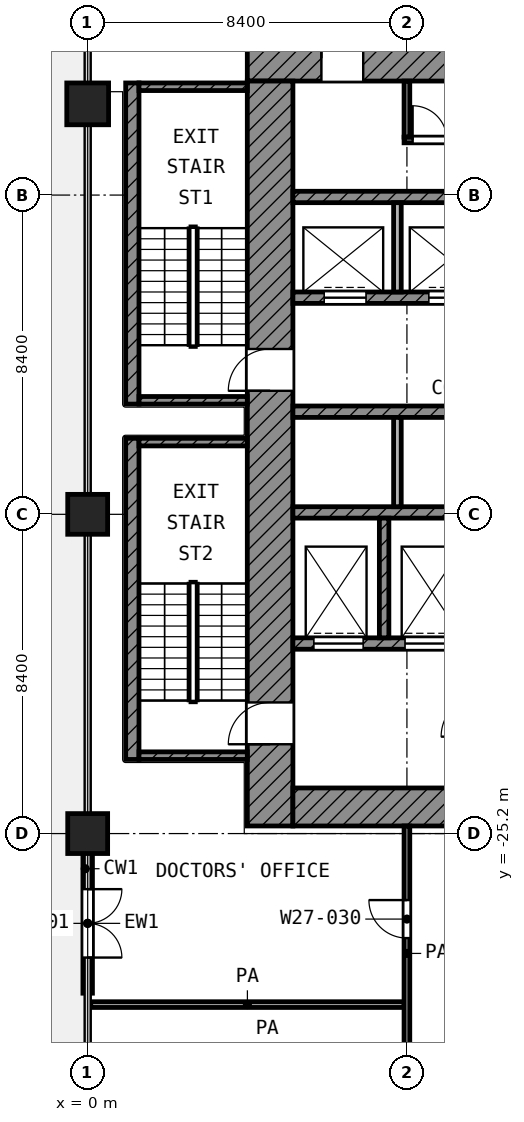
"""IFC4 building model, lengths in metres.
Left out: names, types, materials, properties, quantities, classifications, styles, units other than length and angle.
Written with IfcOpenShell. Run it as: python <this file> out.ifc"""

import sys

from ifc_helpers import new_model, si_unit, direction, frame, frame_2d, origin, origin_2d, place, context, subcontext, project, spatial, rectangle, extrude, element, fill, save


model = new_model("IFC4")
c1 = context("Model", 3, precision=1e-05, world=origin(), true_north=direction((0.0, 1.0)))
c2 = subcontext(c1, "Body", "Model", "MODEL_VIEW")
j1 = project(units=[si_unit("LENGTHUNIT", "METRE"), si_unit("PLANEANGLEUNIT", "RADIAN")], contexts=[c1])
p1 = place(None, origin())
s1 = spatial("IfcSite", under=j1, at=p1, CompositionType="ELEMENT")
p2 = place(p1, origin())
s2 = spatial("IfcBuilding", under=s1, at=p2, CompositionType="ELEMENT")
p3 = place(p2, frame((0.0, 0.0, 140.8)))
s3 = spatial("IfcBuildingStorey", under=s2, at=p3, CompositionType="ELEMENT", Elevation=140.8)
p4 = place(p3, frame((0.0, -6.0, 0.0), z_axis=(0.0, 0.0, 1.0), x_axis=(1.0, 0.0, 0.0)))
e1 = element("IfcColumn", 1, at=p4, inside=s3, PredefinedType="COLUMN", context=c2, shape_type="SweptSolid", body=[
    extrude(rectangle(XDim=1.1, YDim=1.1, at=origin_2d()), origin(), (0.0, 0.0, 1.0), 4.2),
])
for number, where, z_axis, x_axis in (
    (2, (0.0, -16.8, 0.0), (0.0, 0.0, 1.0), (1.0, 0.0, 0.0)),
    (3, (0.0, -25.2, 0.0), (0.0, 0.0, 1.0), (1.0, 0.0, 0.0)),
):
    element("IfcColumn", number, at=place(p3, frame(where, z_axis=z_axis, x_axis=x_axis)), inside=s3, PredefinedType="COLUMN", context=c2, shape_type="SweptSolid", body=[
        extrude(rectangle(XDim=1.05, YDim=1.05, at=origin_2d()), origin(), (0.0, 0.0, 1.0), 4.2),
    ])
p5 = place(p3, frame((0.0, -25.725, 0.0), z_axis=(0.0, 0.0, 1.0), x_axis=(0.0, -1.0, 0.0)))
e4 = element("IfcWall", 4, at=p5, inside=s3, PredefinedType="SOLIDWALL", context=c2, shape_type="SweptSolid", body=[
    extrude(rectangle(XDim=3.675, YDim=0.25, at=frame_2d((1.837, 0.0))), origin(), (0.0, 0.0, 1.0), 3.48),
])
p6 = place(p5, frame((0.938, 0.0, 0.0)))
e5 = element("IfcOpeningElement", 5, at=p6, cuts=e4, PredefinedType="OPENING", context=c2, shape_type="SweptSolid", body=[
    extrude(rectangle(XDim=1.8, YDim=2.1, at=frame_2d((0.9, 1.05))), frame((0.0, 0.135, 0.0), z_axis=(0.0, -1.0, 0.0), x_axis=(1.0, 0.0, 0.0)), (0.0, 0.0, 1.0), 0.27),
])
p7 = place(p3, frame((4.2, -4.8, 0.0), z_axis=(0.0, 0.0, 1.0), x_axis=(1.0, 0.0, 0.0)))
e6 = element("IfcWall", 6, at=p7, inside=s3, PredefinedType="SHEAR", context=c2, shape_type="SweptSolid", body=[
    extrude(rectangle(XDim=20.8, YDim=1.2, at=frame_2d((10.4, 0.0))), origin(), (0.0, 0.0, 1.0), 3.6),
])
p8 = place(p7, frame((1.95, 0.0, 0.0)))
e7 = element("IfcOpeningElement", 7, at=p8, cuts=e6, PredefinedType="OPENING", context=c2, shape_type="SweptSolid", body=[
    extrude(rectangle(XDim=1.1, YDim=2.1, at=frame_2d((0.55, 1.05))), frame((0.0, 0.61, 0.0), z_axis=(0.0, -1.0, 0.0), x_axis=(1.0, 0.0, 0.0)), (0.0, 0.0, 1.0), 1.22),
])
p9 = place(p7, frame((17.95, 0.0, 0.0)))
e8 = element("IfcOpeningElement", 8, at=p9, cuts=e6, PredefinedType="OPENING", context=c2, shape_type="SweptSolid", body=[
    extrude(rectangle(XDim=1.1, YDim=2.1, at=frame_2d((0.55, 1.05))), frame((0.0, 0.61, 0.0), z_axis=(0.0, -1.0, 0.0), x_axis=(1.0, 0.0, 0.0)), (0.0, 0.0, 1.0), 1.22),
])
p10 = place(p3, frame((4.8, -25.0, 0.0), z_axis=(0.0, 0.0, 1.0), x_axis=(0.0, 1.0, 0.0)))
e9 = element("IfcWall", 9, at=p10, inside=s3, PredefinedType="SHEAR", context=c2, shape_type="SweptSolid", body=[
    extrude(rectangle(XDim=19.6, YDim=1.2, at=frame_2d((9.8, 0.0))), origin(), (0.0, 0.0, 1.0), 3.6),
])
p11 = place(p10, frame((11.45, 0.0, 0.0)))
e10 = element("IfcOpeningElement", 10, at=p11, cuts=e9, PredefinedType="OPENING", context=c2, shape_type="SweptSolid", body=[
    extrude(rectangle(XDim=1.1, YDim=2.1, at=frame_2d((0.55, 1.05))), frame((0.0, 0.61, 0.0), z_axis=(0.0, -1.0, 0.0), x_axis=(1.0, 0.0, 0.0)), (0.0, 0.0, 1.0), 1.22),
])
p12 = place(p10, frame((2.15, 0.0, 0.0)))
e11 = element("IfcOpeningElement", 11, at=p12, cuts=e9, PredefinedType="OPENING", context=c2, shape_type="SweptSolid", body=[
    extrude(rectangle(XDim=1.1, YDim=2.1, at=frame_2d((0.55, 1.05))), frame((0.0, 0.61, 0.0), z_axis=(0.0, -1.0, 0.0), x_axis=(1.0, 0.0, 0.0)), (0.0, 0.0, 1.0), 1.22),
])
p13 = place(p3, frame((5.4, -24.5, 0.0), z_axis=(0.0, 0.0, 1.0), x_axis=(1.0, 0.0, 0.0)))
e12 = element("IfcWall", 12, at=p13, inside=s3, PredefinedType="SHEAR", context=c2, shape_type="SweptSolid", body=[
    extrude(rectangle(XDim=18.6, YDim=1.0, at=frame_2d((9.3, 0.0))), origin(), (0.0, 0.0, 1.0), 3.6),
])
p14 = place(p13, frame((6.3, 0.0, 0.0)))
e13 = element("IfcOpeningElement", 13, at=p14, cuts=e12, PredefinedType="OPENING", context=c2, shape_type="SweptSolid", body=[
    extrude(rectangle(XDim=1.8, YDim=2.1, at=frame_2d((0.9, 1.05))), frame((0.0, 0.51, 0.0), z_axis=(0.0, -1.0, 0.0), x_axis=(1.0, 0.0, 0.0)), (0.0, 0.0, 1.0), 1.02),
])
p15 = place(p3, frame((5.4, -8.45, 0.0), z_axis=(0.0, 0.0, 1.0), x_axis=(1.0, 0.0, 0.0)))
e14 = element("IfcWall", 14, at=p15, inside=s3, PredefinedType="SHEAR", context=c2, shape_type="SweptSolid", body=[
    extrude(rectangle(XDim=16.65, YDim=0.3, at=frame_2d((8.325, 0.0))), origin(), (0.0, 0.0, 1.0), 3.6),
])
p16 = place(p3, frame((5.4, -11.1, 0.0), z_axis=(0.0, 0.0, 1.0), x_axis=(1.0, 0.0, 0.0)))
e15 = element("IfcWall", 15, at=p16, inside=s3, PredefinedType="SHEAR", context=c2, shape_type="SweptSolid", body=[
    extrude(rectangle(XDim=16.65, YDim=0.3, at=frame_2d((8.325, 0.0))), origin(), (0.0, 0.0, 1.0), 3.6),
])
p17 = place(p16, frame((0.825, 0.0, 0.0)))
e16 = element("IfcOpeningElement", 16, at=p17, cuts=e15, PredefinedType="OPENING", context=c2, shape_type="SweptSolid", body=[
    extrude(rectangle(XDim=1.1, YDim=2.1, at=frame_2d((0.55, 1.05))), frame((0.0, 0.16, 0.0), z_axis=(0.0, -1.0, 0.0), x_axis=(1.0, 0.0, 0.0)), (0.0, 0.0, 1.0), 0.32),
])
p18 = place(p16, frame((3.575, 0.0, 0.0)))
e17 = element("IfcOpeningElement", 17, at=p18, cuts=e15, PredefinedType="OPENING", context=c2, shape_type="SweptSolid", body=[
    extrude(rectangle(XDim=1.1, YDim=2.1, at=frame_2d((0.55, 1.05))), frame((0.0, 0.16, 0.0), z_axis=(0.0, -1.0, 0.0), x_axis=(1.0, 0.0, 0.0)), (0.0, 0.0, 1.0), 0.32),
])
p19 = place(p16, frame((6.325, 0.0, 0.0)))
e18 = element("IfcOpeningElement", 18, at=p19, cuts=e15, PredefinedType="OPENING", context=c2, shape_type="SweptSolid", body=[
    extrude(rectangle(XDim=1.1, YDim=2.1, at=frame_2d((0.55, 1.05))), frame((0.0, 0.16, 0.0), z_axis=(0.0, -1.0, 0.0), x_axis=(1.0, 0.0, 0.0)), (0.0, 0.0, 1.0), 0.32),
])
p20 = place(p16, frame((9.075, 0.0, 0.0)))
e19 = element("IfcOpeningElement", 19, at=p20, cuts=e15, PredefinedType="OPENING", context=c2, shape_type="SweptSolid", body=[
    extrude(rectangle(XDim=1.1, YDim=2.1, at=frame_2d((0.55, 1.05))), frame((0.0, 0.16, 0.0), z_axis=(0.0, -1.0, 0.0), x_axis=(1.0, 0.0, 0.0)), (0.0, 0.0, 1.0), 0.32),
])
for number, where, z_axis, x_axis in (
    (20, (5.4, -14.1, 0.0), (0.0, 0.0, 1.0), (1.0, 0.0, 0.0)),
    (21, (5.4, -16.75, 0.0), (0.0, 0.0, 1.0), (1.0, 0.0, 0.0)),
):
    element("IfcWall", number, at=place(p3, frame(where, z_axis=z_axis, x_axis=x_axis)), inside=s3, PredefinedType="SHEAR", context=c2, shape_type="SweptSolid", body=[
        extrude(rectangle(XDim=16.65, YDim=0.3, at=frame_2d((8.325, 0.0))), origin(), (0.0, 0.0, 1.0), 3.6),
    ])
p21 = place(p3, frame((5.4, -20.2, 0.0), z_axis=(0.0, 0.0, 1.0), x_axis=(1.0, 0.0, 0.0)))
e22 = element("IfcWall", 22, at=p21, inside=s3, PredefinedType="SHEAR", context=c2, shape_type="SweptSolid", body=[
    extrude(rectangle(XDim=14.65, YDim=0.3, at=frame_2d((7.325, 0.0))), origin(), (0.0, 0.0, 1.0), 3.6),
])
p22 = place(p21, frame((10.55, 0.0, 0.0)))
e23 = element("IfcOpeningElement", 23, at=p22, cuts=e22, PredefinedType="OPENING", context=c2, shape_type="SweptSolid", body=[
    extrude(rectangle(XDim=1.3, YDim=2.1, at=frame_2d((0.65, 1.05))), frame((0.0, 0.16, 0.0), z_axis=(0.0, -1.0, 0.0), x_axis=(1.0, 0.0, 0.0)), (0.0, 0.0, 1.0), 0.32),
])
p23 = place(p21, frame((12.95, 0.0, 0.0)))
e24 = element("IfcOpeningElement", 24, at=p23, cuts=e22, PredefinedType="OPENING", context=c2, shape_type="SweptSolid", body=[
    extrude(rectangle(XDim=1.3, YDim=2.1, at=frame_2d((0.65, 1.05))), frame((0.0, 0.16, 0.0), z_axis=(0.0, -1.0, 0.0), x_axis=(1.0, 0.0, 0.0)), (0.0, 0.0, 1.0), 0.32),
])
p24 = place(p21, frame((0.55, 0.0, 0.0)))
e25 = element("IfcOpeningElement", 25, at=p24, cuts=e22, PredefinedType="OPENING", context=c2, shape_type="SweptSolid", body=[
    extrude(rectangle(XDim=1.3, YDim=2.1, at=frame_2d((0.65, 1.05))), frame((0.0, 0.16, 0.0), z_axis=(0.0, -1.0, 0.0), x_axis=(1.0, 0.0, 0.0)), (0.0, 0.0, 1.0), 0.32),
])
p25 = place(p21, frame((2.95, 0.0, 0.0)))
e26 = element("IfcOpeningElement", 26, at=p25, cuts=e22, PredefinedType="OPENING", context=c2, shape_type="SweptSolid", body=[
    extrude(rectangle(XDim=1.3, YDim=2.1, at=frame_2d((0.65, 1.05))), frame((0.0, 0.16, 0.0), z_axis=(0.0, -1.0, 0.0), x_axis=(1.0, 0.0, 0.0)), (0.0, 0.0, 1.0), 0.32),
])
p26 = place(p21, frame((7.15, 0.0, 0.0)))
e27 = element("IfcOpeningElement", 27, at=p26, cuts=e22, PredefinedType="OPENING", context=c2, shape_type="SweptSolid", body=[
    extrude(rectangle(XDim=0.9, YDim=2.1, at=frame_2d((0.45, 1.05))), frame((0.0, 0.16, 0.0), z_axis=(0.0, -1.0, 0.0), x_axis=(1.0, 0.0, 0.0)), (0.0, 0.0, 1.0), 0.32),
])
p27 = place(p3, frame((7.8, -20.05, 0.0), z_axis=(0.0, 0.0, 1.0), x_axis=(0.0, 1.0, 0.0)))
e28 = element("IfcWall", 28, at=p27, inside=s3, PredefinedType="SHEAR", context=c2, shape_type="SweptSolid", body=[
    extrude(rectangle(XDim=3.15, YDim=0.25, at=frame_2d((1.575, 0.0))), origin(), (0.0, 0.0, 1.0), 3.6),
])
p28 = place(p3, frame((8.15, -10.95, 0.0), z_axis=(0.0, 0.0, 1.0), x_axis=(0.0, 1.0, 0.0)))
e29 = element("IfcWall", 29, at=p28, inside=s3, PredefinedType="PARTITIONING", context=c2, shape_type="SweptSolid", body=[
    extrude(rectangle(XDim=2.35, YDim=0.2, at=frame_2d((1.175, 0.0))), origin(), (0.0, 0.0, 1.0), 3.6),
])
p29 = place(p3, frame((8.15, -16.6, 0.0), z_axis=(0.0, 0.0, 1.0), x_axis=(0.0, 1.0, 0.0)))
e30 = element("IfcWall", 30, at=p29, inside=s3, PredefinedType="PARTITIONING", context=c2, shape_type="SweptSolid", body=[
    extrude(rectangle(XDim=2.35, YDim=0.2, at=frame_2d((1.175, 0.0))), origin(), (0.0, 0.0, 1.0), 3.6),
])
p30 = place(p3, frame((8.325, -6.95, 0.0), z_axis=(0.0, 0.0, 1.0), x_axis=(1.0, 0.0, 0.0)))
e31 = element("IfcWall", 31, at=p30, inside=s3, PredefinedType="PARTITIONING", context=c2, shape_type="SweptSolid", body=[
    extrude(rectangle(XDim=6.45, YDim=0.15, at=frame_2d((3.225, 0.0))), origin(), (0.0, 0.0, 1.0), 3.6),
])
p31 = place(p30, frame((0.225, 0.0, 0.0)))
e32 = element("IfcOpeningElement", 32, at=p31, cuts=e31, PredefinedType="OPENING", context=c2, shape_type="SweptSolid", body=[
    extrude(rectangle(XDim=0.9, YDim=2.1, at=frame_2d((0.45, 1.05))), frame((0.0, 0.085, 0.0), z_axis=(0.0, -1.0, 0.0), x_axis=(1.0, 0.0, 0.0)), (0.0, 0.0, 1.0), 0.17),
])
p32 = place(p30, frame((1.425, 0.0, 0.0)))
e33 = element("IfcOpeningElement", 33, at=p32, cuts=e31, PredefinedType="OPENING", context=c2, shape_type="SweptSolid", body=[
    extrude(rectangle(XDim=0.9, YDim=2.1, at=frame_2d((0.45, 1.05))), frame((0.0, 0.085, 0.0), z_axis=(0.0, -1.0, 0.0), x_axis=(1.0, 0.0, 0.0)), (0.0, 0.0, 1.0), 0.17),
])
p33 = place(p30, frame((3.225, 0.0, 0.0)))
e34 = element("IfcOpeningElement", 34, at=p33, cuts=e31, PredefinedType="OPENING", context=c2, shape_type="SweptSolid", body=[
    extrude(rectangle(XDim=0.9, YDim=2.1, at=frame_2d((0.45, 1.05))), frame((0.0, 0.085, 0.0), z_axis=(0.0, -1.0, 0.0), x_axis=(1.0, 0.0, 0.0)), (0.0, 0.0, 1.0), 0.17),
])
p34 = place(p30, frame((5.175, 0.0, 0.0)))
e35 = element("IfcOpeningElement", 35, at=p34, cuts=e31, PredefinedType="OPENING", context=c2, shape_type="SweptSolid", body=[
    extrude(rectangle(XDim=0.9, YDim=2.1, at=frame_2d((0.45, 1.05))), frame((0.0, 0.085, 0.0), z_axis=(0.0, -1.0, 0.0), x_axis=(1.0, 0.0, 0.0)), (0.0, 0.0, 1.0), 0.17),
])
p35 = place(p3, frame((8.4, -6.875, 0.0), z_axis=(0.0, 0.0, 1.0), x_axis=(0.0, 1.0, 0.0)))
e36 = element("IfcWall", 36, at=p35, inside=s3, PredefinedType="PARTITIONING", context=c2, shape_type="SweptSolid", body=[
    extrude(rectangle(XDim=1.475, YDim=0.15, at=frame_2d((0.738, 0.0))), origin(), (0.0, 0.0, 1.0), 3.6),
])
p36 = place(p3, frame((1.175, -13.9, 0.0), z_axis=(0.0, 0.0, 1.0), x_axis=(0.0, 1.0, 0.0)))
e37 = element("IfcWall", 37, at=p36, inside=s3, PredefinedType="SHEAR", context=c2, shape_type="SweptSolid", body=[
    extrude(rectangle(XDim=8.45, YDim=0.35, at=frame_2d((4.225, 0.0))), origin(), (0.0, 0.0, 1.0), 3.6),
])
for number, where, z_axis, x_axis in (
    (38, (1.35, -5.55, 0.0), (0.0, 0.0, 1.0), (1.0, 0.0, 0.0)),
    (39, (1.35, -13.8, 0.0), (0.0, 0.0, 1.0), (1.0, 0.0, 0.0)),
):
    element("IfcWall", number, at=place(p3, frame(where, z_axis=z_axis, x_axis=x_axis)), inside=s3, PredefinedType="SHEAR", context=c2, shape_type="SweptSolid", body=[
        extrude(rectangle(XDim=2.85, YDim=0.2, at=frame_2d((1.425, 0.0))), origin(), (0.0, 0.0, 1.0), 3.6),
    ])
p37 = place(p3, frame((1.175, -23.25, 0.0), z_axis=(0.0, 0.0, 1.0), x_axis=(0.0, 1.0, 0.0)))
e40 = element("IfcWall", 40, at=p37, inside=s3, PredefinedType="SHEAR", context=c2, shape_type="SweptSolid", body=[
    extrude(rectangle(XDim=8.45, YDim=0.35, at=frame_2d((4.225, 0.0))), origin(), (0.0, 0.0, 1.0), 3.6),
])
for number, where, z_axis, x_axis in (
    (41, (1.35, -14.9, 0.0), (0.0, 0.0, 1.0), (1.0, 0.0, 0.0)),
    (42, (1.35, -23.15, 0.0), (0.0, 0.0, 1.0), (1.0, 0.0, 0.0)),
):
    element("IfcWall", number, at=place(p3, frame(where, z_axis=z_axis, x_axis=x_axis)), inside=s3, PredefinedType="SHEAR", context=c2, shape_type="SweptSolid", body=[
        extrude(rectangle(XDim=2.85, YDim=0.2, at=frame_2d((1.425, 0.0))), origin(), (0.0, 0.0, 1.0), 3.6),
    ])
p38 = place(p3, frame((0.08, -29.7, 0.0), z_axis=(0.0, 0.0, 1.0), x_axis=(1.0, 0.0, 0.0)))
e43 = element("IfcWall", 43, at=p38, inside=s3, PredefinedType="PARTITIONING", context=c2, shape_type="SweptSolid", body=[
    extrude(rectangle(XDim=8.245, YDim=0.15, at=frame_2d((4.123, 0.0))), origin(), (0.0, 0.0, 1.0), 3.6),
])
p39 = place(p3, frame((8.4, -31.707, 0.0), z_axis=(0.0, 0.0, 1.0), x_axis=(0.0, 1.0, 0.0)))
e44 = element("IfcWall", 44, at=p39, inside=s3, PredefinedType="PARTITIONING", context=c2, shape_type="SweptSolid", body=[
    extrude(rectangle(XDim=6.707, YDim=0.15, at=frame_2d((3.354, 0.0))), origin(), (0.0, 0.0, 1.0), 3.6),
])
p40 = place(p39, frame((3.757, 0.0, 0.0)))
e45 = element("IfcOpeningElement", 45, at=p40, cuts=e44, PredefinedType="OPENING", context=c2, shape_type="SweptSolid", body=[
    extrude(rectangle(XDim=1.0, YDim=2.1, at=frame_2d((0.5, 1.05))), frame((0.0, 0.085, 0.0), z_axis=(0.0, -1.0, 0.0), x_axis=(1.0, 0.0, 0.0)), (0.0, 0.0, 1.0), 0.17),
])
p41 = place(p6, origin())
e46 = element("IfcDoor", 46, at=p41, inside=s3, OperationType="DOUBLE_DOOR_SINGLE_SWING", PredefinedType="DOOR", context=c2, shape_type="SweptSolid", body=[
    extrude(rectangle(XDim=1.8, YDim=2.1, at=frame_2d((0.9, 1.05))), frame((0.0, 0.025, 0.0), z_axis=(0.0, -1.0, 0.0), x_axis=(1.0, 0.0, 0.0)), (0.0, 0.0, 1.0), 0.05),
])
fill(e5, e46)
p42 = place(p17, origin())
e47 = element("IfcDoor", 47, at=p42, inside=s3, OperationType="DOUBLE_DOOR_SLIDING", PredefinedType="DOOR", context=c2, shape_type="SweptSolid", body=[
    extrude(rectangle(XDim=1.1, YDim=2.1, at=frame_2d((0.55, 1.05))), frame((0.0, 0.025, 0.0), z_axis=(0.0, -1.0, 0.0), x_axis=(1.0, 0.0, 0.0)), (0.0, 0.0, 1.0), 0.05),
])
fill(e16, e47)
p43 = place(p18, origin())
e48 = element("IfcDoor", 48, at=p43, inside=s3, OperationType="DOUBLE_DOOR_SLIDING", PredefinedType="DOOR", context=c2, shape_type="SweptSolid", body=[
    extrude(rectangle(XDim=1.1, YDim=2.1, at=frame_2d((0.55, 1.05))), frame((0.0, 0.025, 0.0), z_axis=(0.0, -1.0, 0.0), x_axis=(1.0, 0.0, 0.0)), (0.0, 0.0, 1.0), 0.05),
])
fill(e17, e48)
p44 = place(p24, origin())
e49 = element("IfcDoor", 49, at=p44, inside=s3, OperationType="DOUBLE_DOOR_SLIDING", PredefinedType="DOOR", context=c2, shape_type="SweptSolid", body=[
    extrude(rectangle(XDim=1.3, YDim=2.1, at=frame_2d((0.65, 1.05))), frame((0.0, 0.025, 0.0), z_axis=(0.0, -1.0, 0.0), x_axis=(1.0, 0.0, 0.0)), (0.0, 0.0, 1.0), 0.05),
])
fill(e25, e49)
p45 = place(p25, origin())
e50 = element("IfcDoor", 50, at=p45, inside=s3, OperationType="DOUBLE_DOOR_SLIDING", PredefinedType="DOOR", context=c2, shape_type="SweptSolid", body=[
    extrude(rectangle(XDim=1.3, YDim=2.1, at=frame_2d((0.65, 1.05))), frame((0.0, 0.025, 0.0), z_axis=(0.0, -1.0, 0.0), x_axis=(1.0, 0.0, 0.0)), (0.0, 0.0, 1.0), 0.05),
])
fill(e26, e50)
p46 = place(p11, origin())
e51 = element("IfcDoor", 51, at=p46, inside=s3, OperationType="SINGLE_SWING_LEFT", PredefinedType="DOOR", context=c2, shape_type="SweptSolid", body=[
    extrude(rectangle(XDim=1.1, YDim=2.1, at=frame_2d((0.55, 1.05))), frame((0.0, 0.025, 0.0), z_axis=(0.0, -1.0, 0.0), x_axis=(1.0, 0.0, 0.0)), (0.0, 0.0, 1.0), 0.05),
])
fill(e10, e51)
p47 = place(p12, origin())
e52 = element("IfcDoor", 52, at=p47, inside=s3, OperationType="SINGLE_SWING_LEFT", PredefinedType="DOOR", context=c2, shape_type="SweptSolid", body=[
    extrude(rectangle(XDim=1.1, YDim=2.1, at=frame_2d((0.55, 1.05))), frame((0.0, 0.025, 0.0), z_axis=(0.0, -1.0, 0.0), x_axis=(1.0, 0.0, 0.0)), (0.0, 0.0, 1.0), 0.05),
])
fill(e11, e52)
p48 = place(p8, origin())
e53 = element("IfcDoor", 53, at=p48, inside=s3, OperationType="SINGLE_SWING_LEFT", PredefinedType="DOOR", context=c2, shape_type="SweptSolid", body=[
    extrude(rectangle(XDim=1.1, YDim=2.1, at=frame_2d((0.55, 1.05))), frame((0.0, 0.025, 0.0), z_axis=(0.0, -1.0, 0.0), x_axis=(1.0, 0.0, 0.0)), (0.0, 0.0, 1.0), 0.05),
])
fill(e7, e53)
p49 = place(p31, origin())
e54 = element("IfcDoor", 54, at=p49, inside=s3, OperationType="SINGLE_SWING_LEFT", PredefinedType="DOOR", context=c2, shape_type="SweptSolid", body=[
    extrude(rectangle(XDim=0.9, YDim=2.1, at=frame_2d((0.45, 1.05))), frame((0.0, 0.025, 0.0), z_axis=(0.0, -1.0, 0.0), x_axis=(1.0, 0.0, 0.0)), (0.0, 0.0, 1.0), 0.05),
])
fill(e32, e54)
p50 = place(p40, origin())
e55 = element("IfcDoor", 55, at=p50, inside=s3, OperationType="SINGLE_SWING_RIGHT", PredefinedType="DOOR", context=c2, shape_type="SweptSolid", body=[
    extrude(rectangle(XDim=1.0, YDim=2.1, at=frame_2d((0.5, 1.05))), frame((0.0, 0.025, 0.0), z_axis=(0.0, -1.0, 0.0), x_axis=(1.0, 0.0, 0.0)), (0.0, 0.0, 1.0), 0.05),
])
fill(e45, e55)
save(model, sys.argv[1])
